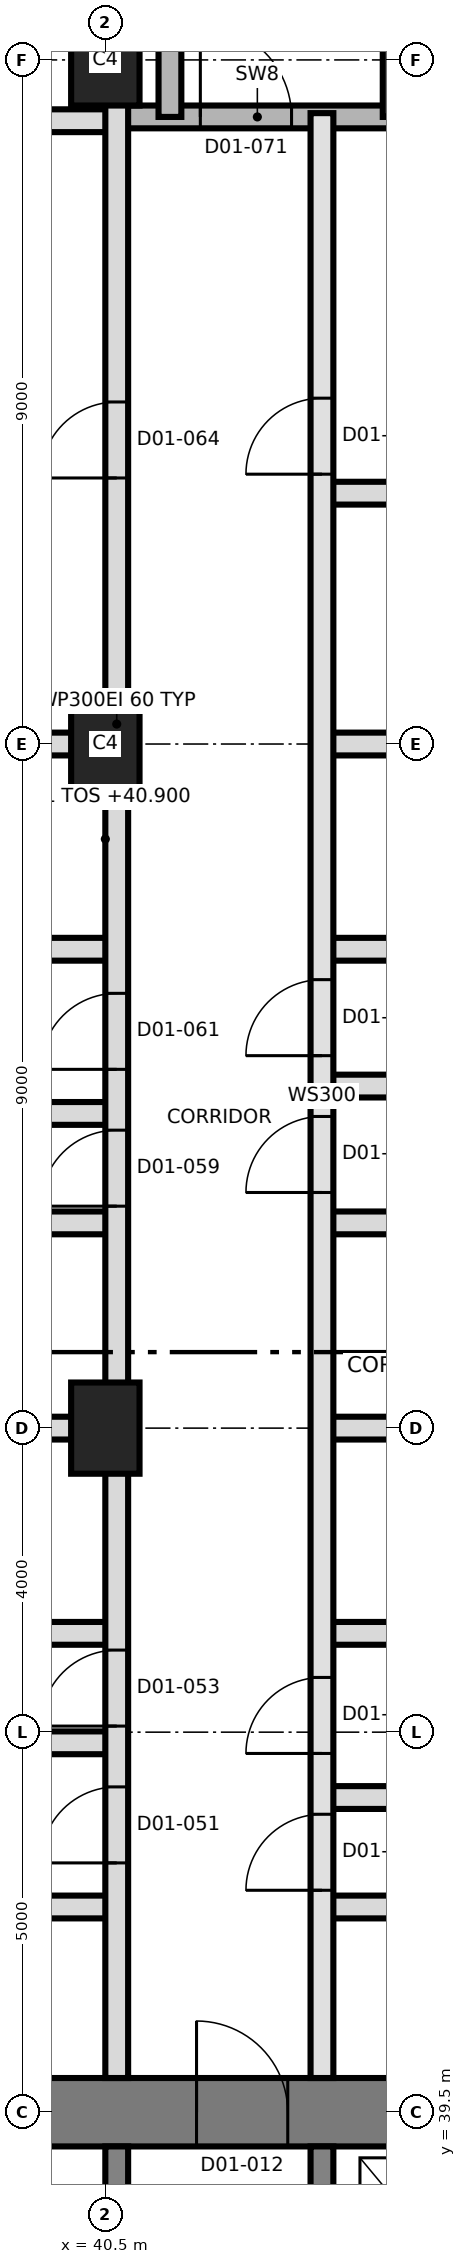
"""IFC4 building model, lengths in metres.
Left out: names, types, materials, properties, quantities, classifications, styles, units other than length and angle.
Written with IfcOpenShell. Run it as: python <this file> out.ifc"""

import sys

from ifc_helpers import new_model, si_unit, direction, frame, frame_2d, origin, origin_2d, place, context, subcontext, project, spatial, rectangle, extrude, element, fill, save


model = new_model("IFC4")
c1 = context("Model", 3, precision=1e-05, world=origin(), true_north=direction((0.0, 1.0)))
c2 = subcontext(c1, "Body", "Model", "MODEL_VIEW")
j1 = project(units=[si_unit("LENGTHUNIT", "METRE"), si_unit("PLANEANGLEUNIT", "RADIAN")], contexts=[c1])
p1 = place(None, origin())
s1 = spatial("IfcSite", under=j1, at=p1, CompositionType="ELEMENT")
p2 = place(p1, origin())
s2 = spatial("IfcBuilding", under=s1, at=p2, CompositionType="ELEMENT")
p3 = place(p2, frame((0.0, 0.0, 40.9)))
s3 = spatial("IfcBuildingStorey", under=s2, at=p3, CompositionType="ELEMENT", Elevation=40.9)
p4 = place(p3, frame((31.05, 39.5, 0.0), z_axis=(0.0, 0.0, 1.0), x_axis=(1.0, 0.0, 0.0)))
e1 = element("IfcWall", 1, at=p4, inside=s3, PredefinedType="SHEAR", context=c2, shape_type="SweptSolid", body=[
    extrude(rectangle(XDim=27.0, YDim=0.9, at=frame_2d((13.5, 0.0))), origin(), (0.0, 0.0, 1.0), 3.7),
])
p5 = place(p4, frame((10.65, 0.0, 0.0)))
e2 = element("IfcOpeningElement", 2, at=p5, cuts=e1, PredefinedType="OPENING", context=c2, shape_type="SweptSolid", body=[
    extrude(rectangle(XDim=1.2, YDim=2.1, at=frame_2d((0.6, 1.05))), frame((0.0, 0.46, 0.0), z_axis=(0.0, -1.0, 0.0), x_axis=(1.0, 0.0, 0.0)), (0.0, 0.0, 1.0), 0.92),
])
for number, where, z_axis, x_axis in (
    (3, (40.65, 33.5, 0.0), (0.0, 0.0, 1.0), (0.0, 1.0, 0.0)),
    (4, (43.35, 33.5, 0.0), (0.0, 0.0, 1.0), (0.0, 1.0, 0.0)),
):
    element("IfcWall", number, at=place(p3, frame(where, z_axis=z_axis, x_axis=x_axis)), inside=s3, PredefinedType="SHEAR", context=c2, shape_type="SweptSolid", body=[
        extrude(rectangle(XDim=5.55, YDim=0.3, at=frame_2d((2.775, 0.0))), origin(), (0.0, 0.0, 1.0), 3.7),
    ])
for number, where, z_axis, x_axis in (
    (5, (40.5, 48.5, 0.0), (0.0, 0.0, 1.0), (0.0, 1.0, 0.0)),
    (6, (40.5, 57.5, 0.0), (0.0, 0.0, 1.0), (0.0, 1.0, 0.0)),
    (7, (40.5, 66.5, 0.0), (0.0, 0.0, 1.0), (0.0, 1.0, 0.0)),
):
    element("IfcColumn", number, at=place(p3, frame(where, z_axis=z_axis, x_axis=x_axis)), inside=s3, PredefinedType="COLUMN", context=c2, shape_type="SweptSolid", body=[
        extrude(rectangle(XDim=1.2, YDim=0.9, at=origin_2d()), origin(), (0.0, 0.0, 1.0), 3.7),
    ])
for number, where, z_axis, x_axis in (
    (8, (37.45, 42.2, 0.0), (0.0, 0.0, 1.0), (1.0, 0.0, 0.0)),
    (9, (43.35, 42.2, 0.0), (0.0, 0.0, 1.0), (1.0, 0.0, 0.0)),
):
    element("IfcWall", number, at=place(p3, frame(where, z_axis=z_axis, x_axis=x_axis)), inside=s3, PredefinedType="PARTITIONING", context=c2, shape_type="SweptSolid", body=[
        extrude(rectangle(XDim=3.2, YDim=0.3, at=frame_2d((1.6, 0.0))), origin(), (0.0, 0.0, 1.0), 3.4),
    ])
p6 = place(p3, frame((43.35, 43.64, 0.0), z_axis=(0.0, 0.0, 1.0), x_axis=(1.0, 0.0, 0.0)))
e10 = element("IfcWall", 10, at=p6, inside=s3, PredefinedType="PARTITIONING", context=c2, shape_type="SweptSolid", body=[
    extrude(rectangle(XDim=6.796, YDim=0.3, at=frame_2d((3.398, 0.0))), origin(), (0.0, 0.0, 1.0), 3.4),
])
p7 = place(p3, frame((31.425, 44.36, 0.0), z_axis=(0.0, 0.0, 1.0), x_axis=(1.0, 0.0, 0.0)))
e11 = element("IfcWall", 11, at=p7, inside=s3, PredefinedType="PARTITIONING", context=c2, shape_type="SweptSolid", body=[
    extrude(rectangle(XDim=9.225, YDim=0.3, at=frame_2d((4.612, 0.0))), origin(), (0.0, 0.0, 1.0), 3.4),
])
for number, where, z_axis, x_axis in (
    (12, (37.45, 45.8, 0.0), (0.0, 0.0, 1.0), (1.0, 0.0, 0.0)),
    (13, (43.35, 45.8, 0.0), (0.0, 0.0, 1.0), (1.0, 0.0, 0.0)),
):
    element("IfcWall", number, at=place(p3, frame(where, z_axis=z_axis, x_axis=x_axis)), inside=s3, PredefinedType="PARTITIONING", context=c2, shape_type="SweptSolid", body=[
        extrude(rectangle(XDim=3.2, YDim=0.3, at=frame_2d((1.6, 0.0))), origin(), (0.0, 0.0, 1.0), 3.4),
    ])
p8 = place(p3, frame((31.425, 48.5, 0.0), z_axis=(0.0, 0.0, 1.0), x_axis=(1.0, 0.0, 0.0)))
e14 = element("IfcWall", 14, at=p8, inside=s3, PredefinedType="PARTITIONING", context=c2, shape_type="SweptSolid", body=[
    extrude(rectangle(XDim=9.225, YDim=0.3, at=frame_2d((4.612, 0.0))), origin(), (0.0, 0.0, 1.0), 3.4),
])
p9 = place(p3, frame((43.35, 48.5, 0.0), z_axis=(0.0, 0.0, 1.0), x_axis=(1.0, 0.0, 0.0)))
e15 = element("IfcWall", 15, at=p9, inside=s3, PredefinedType="PARTITIONING", context=c2, shape_type="SweptSolid", body=[
    extrude(rectangle(XDim=6.225, YDim=0.3, at=frame_2d((3.112, 0.0))), origin(), (0.0, 0.0, 1.0), 3.4),
])
for number, where, z_axis, x_axis in (
    (16, (37.45, 51.2, 0.0), (0.0, 0.0, 1.0), (1.0, 0.0, 0.0)),
    (17, (43.35, 51.2, 0.0), (0.0, 0.0, 1.0), (1.0, 0.0, 0.0)),
):
    element("IfcWall", number, at=place(p3, frame(where, z_axis=z_axis, x_axis=x_axis)), inside=s3, PredefinedType="PARTITIONING", context=c2, shape_type="SweptSolid", body=[
        extrude(rectangle(XDim=3.2, YDim=0.3, at=frame_2d((1.6, 0.0))), origin(), (0.0, 0.0, 1.0), 3.4),
    ])
p10 = place(p3, frame((31.425, 52.64, 0.0), z_axis=(0.0, 0.0, 1.0), x_axis=(1.0, 0.0, 0.0)))
e18 = element("IfcWall", 18, at=p10, inside=s3, PredefinedType="PARTITIONING", context=c2, shape_type="SweptSolid", body=[
    extrude(rectangle(XDim=9.225, YDim=0.3, at=frame_2d((4.612, 0.0))), origin(), (0.0, 0.0, 1.0), 3.4),
])
p11 = place(p3, frame((43.35, 53.0, 0.0), z_axis=(0.0, 0.0, 1.0), x_axis=(1.0, 0.0, 0.0)))
e19 = element("IfcWall", 19, at=p11, inside=s3, PredefinedType="PARTITIONING", context=c2, shape_type="SweptSolid", body=[
    extrude(rectangle(XDim=6.405, YDim=0.3, at=frame_2d((3.202, 0.0))), origin(), (0.0, 0.0, 1.0), 3.4),
])
for number, where, z_axis, x_axis in (
    (20, (37.45, 54.8, 0.0), (0.0, 0.0, 1.0), (1.0, 0.0, 0.0)),
    (21, (43.35, 54.8, 0.0), (0.0, 0.0, 1.0), (1.0, 0.0, 0.0)),
):
    element("IfcWall", number, at=place(p3, frame(where, z_axis=z_axis, x_axis=x_axis)), inside=s3, PredefinedType="PARTITIONING", context=c2, shape_type="SweptSolid", body=[
        extrude(rectangle(XDim=3.2, YDim=0.3, at=frame_2d((1.6, 0.0))), origin(), (0.0, 0.0, 1.0), 3.4),
    ])
p12 = place(p3, frame((31.425, 57.5, 0.0), z_axis=(0.0, 0.0, 1.0), x_axis=(1.0, 0.0, 0.0)))
e22 = element("IfcWall", 22, at=p12, inside=s3, PredefinedType="PARTITIONING", context=c2, shape_type="SweptSolid", body=[
    extrude(rectangle(XDim=9.225, YDim=0.3, at=frame_2d((4.612, 0.0))), origin(), (0.0, 0.0, 1.0), 3.4),
])
p13 = place(p3, frame((43.35, 57.5, 0.0), z_axis=(0.0, 0.0, 1.0), x_axis=(1.0, 0.0, 0.0)))
e23 = element("IfcWall", 23, at=p13, inside=s3, PredefinedType="PARTITIONING", context=c2, shape_type="SweptSolid", body=[
    extrude(rectangle(XDim=6.225, YDim=0.3, at=frame_2d((3.112, 0.0))), origin(), (0.0, 0.0, 1.0), 3.4),
])
p14 = place(p3, frame((43.35, 60.8, 0.0), z_axis=(0.0, 0.0, 1.0), x_axis=(1.0, 0.0, 0.0)))
e24 = element("IfcWall", 24, at=p14, inside=s3, PredefinedType="PARTITIONING", context=c2, shape_type="SweptSolid", body=[
    extrude(rectangle(XDim=3.5, YDim=0.3, at=frame_2d((1.75, 0.0))), origin(), (0.0, 0.0, 1.0), 3.4),
])
p15 = place(p3, frame((31.425, 65.7, 0.0), z_axis=(0.0, 0.0, 1.0), x_axis=(1.0, 0.0, 0.0)))
e25 = element("IfcWall", 25, at=p15, inside=s3, PredefinedType="PARTITIONING", context=c2, shape_type="SweptSolid", body=[
    extrude(rectangle(XDim=9.225, YDim=0.3, at=frame_2d((4.612, 0.0))), origin(), (0.0, 0.0, 1.0), 3.4),
])
p16 = place(p15, frame((3.575, 0.0, 0.0)))
e26 = element("IfcOpeningElement", 26, at=p16, cuts=e25, PredefinedType="OPENING", context=c2, shape_type="SweptSolid", body=[
    extrude(rectangle(XDim=1.0, YDim=2.1, at=frame_2d((0.5, 1.05))), frame((0.0, 0.16, 0.0), z_axis=(0.0, -1.0, 0.0), x_axis=(1.0, 0.0, 0.0)), (0.0, 0.0, 1.0), 0.32),
])
p17 = place(p3, frame((40.65, 65.75, 0.0), z_axis=(0.0, 0.0, 1.0), x_axis=(1.0, 0.0, 0.0)))
e27 = element("IfcWall", 27, at=p17, inside=s3, PredefinedType="SHEAR", context=c2, shape_type="SweptSolid", body=[
    extrude(rectangle(XDim=3.7, YDim=0.3, at=frame_2d((1.85, 0.0))), origin(), (0.0, 0.0, 1.0), 3.4),
])
p18 = place(p17, frame((1.1, 0.0, 0.0)))
e28 = element("IfcOpeningElement", 28, at=p18, cuts=e27, PredefinedType="OPENING", context=c2, shape_type="SweptSolid", body=[
    extrude(rectangle(XDim=1.2, YDim=2.1, at=frame_2d((0.6, 1.05))), frame((0.0, 0.16, 0.0), z_axis=(0.0, -1.0, 0.0), x_axis=(1.0, 0.0, 0.0)), (0.0, 0.0, 1.0), 0.32),
])
p19 = place(p3, frame((40.65, 39.95, 0.0), z_axis=(0.0, 0.0, 1.0), x_axis=(0.0, 1.0, 0.0)))
e29 = element("IfcWall", 29, at=p19, inside=s3, PredefinedType="PARTITIONING", context=c2, shape_type="SweptSolid", body=[
    extrude(rectangle(XDim=35.625, YDim=0.3, at=frame_2d((17.812, 0.0))), origin(), (0.0, 0.0, 1.0), 3.4),
])
p20 = place(p19, frame((2.83, 0.0, 0.0)))
e30 = element("IfcOpeningElement", 30, at=p20, cuts=e29, PredefinedType="OPENING", context=c2, shape_type="SweptSolid", body=[
    extrude(rectangle(XDim=1.0, YDim=2.1, at=frame_2d((0.5, 1.05))), frame((0.0, 0.16, 0.0), z_axis=(0.0, -1.0, 0.0), x_axis=(1.0, 0.0, 0.0)), (0.0, 0.0, 1.0), 0.32),
])
p21 = place(p19, frame((4.63, 0.0, 0.0)))
e31 = element("IfcOpeningElement", 31, at=p21, cuts=e29, PredefinedType="OPENING", context=c2, shape_type="SweptSolid", body=[
    extrude(rectangle(XDim=1.0, YDim=2.1, at=frame_2d((0.5, 1.05))), frame((0.0, 0.16, 0.0), z_axis=(0.0, -1.0, 0.0), x_axis=(1.0, 0.0, 0.0)), (0.0, 0.0, 1.0), 0.32),
])
p22 = place(p19, frame((11.47, 0.0, 0.0)))
e32 = element("IfcOpeningElement", 32, at=p22, cuts=e29, PredefinedType="OPENING", context=c2, shape_type="SweptSolid", body=[
    extrude(rectangle(XDim=1.0, YDim=2.1, at=frame_2d((0.5, 1.05))), frame((0.0, 0.16, 0.0), z_axis=(0.0, -1.0, 0.0), x_axis=(1.0, 0.0, 0.0)), (0.0, 0.0, 1.0), 0.32),
])
p23 = place(p19, frame((13.27, 0.0, 0.0)))
e33 = element("IfcOpeningElement", 33, at=p23, cuts=e29, PredefinedType="OPENING", context=c2, shape_type="SweptSolid", body=[
    extrude(rectangle(XDim=1.0, YDim=2.1, at=frame_2d((0.5, 1.05))), frame((0.0, 0.16, 0.0), z_axis=(0.0, -1.0, 0.0), x_axis=(1.0, 0.0, 0.0)), (0.0, 0.0, 1.0), 0.32),
])
p24 = place(p19, frame((21.05, 0.0, 0.0)))
e34 = element("IfcOpeningElement", 34, at=p24, cuts=e29, PredefinedType="OPENING", context=c2, shape_type="SweptSolid", body=[
    extrude(rectangle(XDim=1.0, YDim=2.4, at=frame_2d((0.5, 1.2))), frame((0.0, 0.16, 0.0), z_axis=(0.0, -1.0, 0.0), x_axis=(1.0, 0.0, 0.0)), (0.0, 0.0, 1.0), 0.32),
])
p25 = place(p3, frame((41.35, 65.75, 0.0), z_axis=(0.0, 0.0, 1.0), x_axis=(0.0, 1.0, 0.0)))
e35 = element("IfcWall", 35, at=p25, inside=s3, PredefinedType="SHEAR", context=c2, shape_type="SweptSolid", body=[
    extrude(rectangle(XDim=8.85, YDim=0.3, at=frame_2d((4.425, 0.0))), origin(), (0.0, 0.0, 1.0), 3.4),
])
p26 = place(p3, frame((43.35, 39.95, 0.0), z_axis=(0.0, 0.0, 1.0), x_axis=(0.0, 1.0, 0.0)))
e36 = element("IfcWall", 36, at=p26, inside=s3, PredefinedType="SOLIDWALL", context=c2, shape_type="SweptSolid", body=[
    extrude(rectangle(XDim=25.85, YDim=0.3, at=frame_2d((12.925, 0.0))), origin(), (0.0, 0.0, 1.0), 3.4),
])
p27 = place(p26, frame((2.47, 0.0, 0.0)))
e37 = element("IfcOpeningElement", 37, at=p27, cuts=e36, PredefinedType="OPENING", context=c2, shape_type="SweptSolid", body=[
    extrude(rectangle(XDim=1.0, YDim=2.1, at=frame_2d((0.5, 1.05))), frame((0.0, 0.16, 0.0), z_axis=(0.0, -1.0, 0.0), x_axis=(1.0, 0.0, 0.0)), (0.0, 0.0, 1.0), 0.32),
])
p28 = place(p26, frame((4.27, 0.0, 0.0)))
e38 = element("IfcOpeningElement", 38, at=p28, cuts=e36, PredefinedType="OPENING", context=c2, shape_type="SweptSolid", body=[
    extrude(rectangle(XDim=1.0, YDim=2.1, at=frame_2d((0.5, 1.05))), frame((0.0, 0.16, 0.0), z_axis=(0.0, -1.0, 0.0), x_axis=(1.0, 0.0, 0.0)), (0.0, 0.0, 1.0), 0.32),
])
p29 = place(p26, frame((11.65, 0.0, 0.0)))
e39 = element("IfcOpeningElement", 39, at=p29, cuts=e36, PredefinedType="OPENING", context=c2, shape_type="SweptSolid", body=[
    extrude(rectangle(XDim=1.0, YDim=2.1, at=frame_2d((0.5, 1.05))), frame((0.0, 0.16, 0.0), z_axis=(0.0, -1.0, 0.0), x_axis=(1.0, 0.0, 0.0)), (0.0, 0.0, 1.0), 0.32),
])
p30 = place(p26, frame((13.45, 0.0, 0.0)))
e40 = element("IfcOpeningElement", 40, at=p30, cuts=e36, PredefinedType="OPENING", context=c2, shape_type="SweptSolid", body=[
    extrude(rectangle(XDim=1.0, YDim=2.1, at=frame_2d((0.5, 1.05))), frame((0.0, 0.16, 0.0), z_axis=(0.0, -1.0, 0.0), x_axis=(1.0, 0.0, 0.0)), (0.0, 0.0, 1.0), 0.32),
])
p31 = place(p26, frame((21.1, 0.0, 0.0)))
e41 = element("IfcOpeningElement", 41, at=p31, cuts=e36, PredefinedType="OPENING", context=c2, shape_type="SweptSolid", body=[
    extrude(rectangle(XDim=1.0, YDim=2.4, at=frame_2d((0.5, 1.2))), frame((0.0, 0.16, 0.0), z_axis=(0.0, -1.0, 0.0), x_axis=(1.0, 0.0, 0.0)), (0.0, 0.0, 1.0), 0.32),
])
p32 = place(p3, frame((44.3, 65.75, 0.0), z_axis=(0.0, 0.0, 1.0), x_axis=(0.0, 1.0, 0.0)))
e42 = element("IfcWall", 42, at=p32, inside=s3, PredefinedType="SHEAR", context=c2, shape_type="SweptSolid", body=[
    extrude(rectangle(XDim=8.85, YDim=0.3, at=frame_2d((4.425, 0.0))), origin(), (0.0, 0.0, 1.0), 3.4),
])
p33 = place(p5, origin())
e43 = element("IfcDoor", 43, at=p33, inside=s3, OperationType="SINGLE_SWING_RIGHT", PredefinedType="DOOR", context=c2, shape_type="SweptSolid", body=[
    extrude(rectangle(XDim=1.2, YDim=2.1, at=frame_2d((0.6, 1.05))), frame((0.0, 0.025, 0.0), z_axis=(0.0, -1.0, 0.0), x_axis=(1.0, 0.0, 0.0)), (0.0, 0.0, 1.0), 0.05),
])
fill(e2, e43)
p34 = place(p27, origin())
e44 = element("IfcDoor", 44, at=p34, inside=s3, OperationType="SINGLE_SWING_LEFT", PredefinedType="DOOR", context=c2, shape_type="SweptSolid", body=[
    extrude(rectangle(XDim=1.0, YDim=2.1, at=frame_2d((0.5, 1.05))), frame((0.0, 0.025, 0.0), z_axis=(0.0, -1.0, 0.0), x_axis=(1.0, 0.0, 0.0)), (0.0, 0.0, 1.0), 0.05),
])
fill(e37, e44)
p35 = place(p28, origin())
e45 = element("IfcDoor", 45, at=p35, inside=s3, OperationType="SINGLE_SWING_LEFT", PredefinedType="DOOR", context=c2, shape_type="SweptSolid", body=[
    extrude(rectangle(XDim=1.0, YDim=2.1, at=frame_2d((0.5, 1.05))), frame((0.0, 0.025, 0.0), z_axis=(0.0, -1.0, 0.0), x_axis=(1.0, 0.0, 0.0)), (0.0, 0.0, 1.0), 0.05),
])
fill(e38, e45)
p36 = place(p20, origin())
e46 = element("IfcDoor", 46, at=p36, inside=s3, OperationType="SINGLE_SWING_RIGHT", PredefinedType="DOOR", context=c2, shape_type="SweptSolid", body=[
    extrude(rectangle(XDim=1.0, YDim=2.1, at=frame_2d((0.5, 1.05))), frame((0.0, 0.025, 0.0), z_axis=(0.0, -1.0, 0.0), x_axis=(1.0, 0.0, 0.0)), (0.0, 0.0, 1.0), 0.05),
])
fill(e30, e46)
p37 = place(p21, origin())
e47 = element("IfcDoor", 47, at=p37, inside=s3, OperationType="SINGLE_SWING_LEFT", PredefinedType="DOOR", context=c2, shape_type="SweptSolid", body=[
    extrude(rectangle(XDim=1.0, YDim=2.1, at=frame_2d((0.5, 1.05))), frame((0.0, 0.025, 0.0), z_axis=(0.0, -1.0, 0.0), x_axis=(1.0, 0.0, 0.0)), (0.0, 0.0, 1.0), 0.05),
])
fill(e31, e47)
p38 = place(p29, origin())
e48 = element("IfcDoor", 48, at=p38, inside=s3, OperationType="SINGLE_SWING_LEFT", PredefinedType="DOOR", context=c2, shape_type="SweptSolid", body=[
    extrude(rectangle(XDim=1.0, YDim=2.1, at=frame_2d((0.5, 1.05))), frame((0.0, 0.025, 0.0), z_axis=(0.0, -1.0, 0.0), x_axis=(1.0, 0.0, 0.0)), (0.0, 0.0, 1.0), 0.05),
])
fill(e39, e48)
p39 = place(p30, origin())
e49 = element("IfcDoor", 49, at=p39, inside=s3, OperationType="SINGLE_SWING_RIGHT", PredefinedType="DOOR", context=c2, shape_type="SweptSolid", body=[
    extrude(rectangle(XDim=1.0, YDim=2.1, at=frame_2d((0.5, 1.05))), frame((0.0, 0.025, 0.0), z_axis=(0.0, -1.0, 0.0), x_axis=(1.0, 0.0, 0.0)), (0.0, 0.0, 1.0), 0.05),
])
fill(e40, e49)
p40 = place(p22, origin())
e50 = element("IfcDoor", 50, at=p40, inside=s3, OperationType="SINGLE_SWING_LEFT", PredefinedType="DOOR", context=c2, shape_type="SweptSolid", body=[
    extrude(rectangle(XDim=1.0, YDim=2.1, at=frame_2d((0.5, 1.05))), frame((0.0, 0.025, 0.0), z_axis=(0.0, -1.0, 0.0), x_axis=(1.0, 0.0, 0.0)), (0.0, 0.0, 1.0), 0.05),
])
fill(e32, e50)
p41 = place(p23, origin())
e51 = element("IfcDoor", 51, at=p41, inside=s3, OperationType="SINGLE_SWING_LEFT", PredefinedType="DOOR", context=c2, shape_type="SweptSolid", body=[
    extrude(rectangle(XDim=1.0, YDim=2.1, at=frame_2d((0.5, 1.05))), frame((0.0, 0.025, 0.0), z_axis=(0.0, -1.0, 0.0), x_axis=(1.0, 0.0, 0.0)), (0.0, 0.0, 1.0), 0.05),
])
fill(e33, e51)
p42 = place(p31, origin())
e52 = element("IfcDoor", 52, at=p42, inside=s3, OperationType="SINGLE_SWING_RIGHT", PredefinedType="DOOR", context=c2, shape_type="SweptSolid", body=[
    extrude(rectangle(XDim=1.0, YDim=2.4, at=frame_2d((0.5, 1.2))), frame((0.0, 0.025, 0.0), z_axis=(0.0, -1.0, 0.0), x_axis=(1.0, 0.0, 0.0)), (0.0, 0.0, 1.0), 0.05),
])
fill(e41, e52)
p43 = place(p24, origin())
e53 = element("IfcDoor", 53, at=p43, inside=s3, OperationType="SINGLE_SWING_LEFT", PredefinedType="DOOR", context=c2, shape_type="SweptSolid", body=[
    extrude(rectangle(XDim=1.0, YDim=2.4, at=frame_2d((0.5, 1.2))), frame((0.0, 0.025, 0.0), z_axis=(0.0, -1.0, 0.0), x_axis=(1.0, 0.0, 0.0)), (0.0, 0.0, 1.0), 0.05),
])
fill(e34, e53)
p44 = place(p18, origin())
e54 = element("IfcDoor", 54, at=p44, inside=s3, OperationType="SINGLE_SWING_RIGHT", PredefinedType="DOOR", context=c2, shape_type="SweptSolid", body=[
    extrude(rectangle(XDim=1.2, YDim=2.1, at=frame_2d((0.6, 1.05))), frame((0.0, 0.025, 0.0), z_axis=(0.0, -1.0, 0.0), x_axis=(1.0, 0.0, 0.0)), (0.0, 0.0, 1.0), 0.05),
])
fill(e28, e54)
save(model, sys.argv[1])
